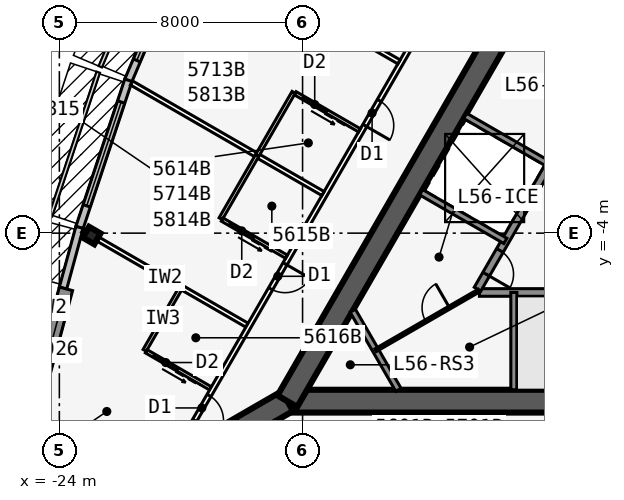
"""IFC4 building model, lengths in metres.
Left out: names, types, materials, properties, quantities, classifications, styles, units other than length and angle.
Written with IfcOpenShell. Run it as: python <this file> out.ifc"""

import sys

from ifc_helpers import new_model, si_unit, direction, frame, frame_2d, origin, origin_2d, place, context, subcontext, project, spatial, polyline, rectangle, i_section, outline, extrude, element, fill, save


model = new_model("IFC4")
c1 = context("Model", 3, precision=1e-05, world=origin(), true_north=direction((0.0, 1.0)))
c2 = subcontext(c1, "Body", "Model", "MODEL_VIEW")
j1 = project(units=[si_unit("LENGTHUNIT", "METRE"), si_unit("PLANEANGLEUNIT", "RADIAN")], contexts=[c1])
p1 = place(None, origin())
s1 = spatial("IfcSite", under=j1, at=p1, CompositionType="ELEMENT")
p2 = place(p1, origin())
s2 = spatial("IfcBuilding", under=s1, at=p2, CompositionType="ELEMENT")
p3 = place(p2, frame((0.0, 0.0, 211.7)))
s3 = spatial("IfcBuildingStorey", under=s2, at=p3, CompositionType="ELEMENT", Elevation=211.7)
p4 = place(p3, frame((-16.5, -9.526, 0.0), z_axis=(0.0, 0.0, 1.0), x_axis=(1.0, 0.0, 0.0)))
e1 = element("IfcWall", 1, at=p4, inside=s3, PredefinedType="SHEAR", context=c2, shape_type="SweptSolid", body=[
    extrude(rectangle(XDim=33.0, YDim=0.75, at=frame_2d((16.5, 0.0))), origin(), (0.0, 0.0, 1.0), 3.6),
])
p5 = place(p4, frame((14.05, 0.0, 0.0)))
e2 = element("IfcOpeningElement", 2, at=p5, cuts=e1, PredefinedType="OPENING", context=c2, shape_type="SweptSolid", body=[
    extrude(rectangle(XDim=1.8, YDim=2.13, at=frame_2d((0.9, 1.065))), frame((0.0, 0.385, 0.0), z_axis=(0.0, -1.0, 0.0), x_axis=(1.0, 0.0, 0.0)), (0.0, 0.0, 1.0), 0.77),
])
p6 = place(p3, frame((-10.183, -5.951, 0.0), z_axis=(0.0, 0.0, 1.0), x_axis=(1.0, 0.0, 0.0)))
e3 = element("IfcWall", 3, at=p6, inside=s3, PredefinedType="SOLIDWALL", context=c2, shape_type="SweptSolid", body=[
    extrude(rectangle(XDim=7.633, YDim=0.25, at=frame_2d((3.816, 0.0))), origin(), (0.0, 0.0, 1.0), 3.435),
])
p7 = place(p3, frame((-9.05, -5.951, 0.0), z_axis=(0.0, 0.0, 1.0), x_axis=(0.0, -1.0, 0.0)))
e4 = element("IfcWall", 4, at=p7, inside=s3, PredefinedType="SOLIDWALL", context=c2, shape_type="SweptSolid", body=[
    extrude(rectangle(XDim=3.2, YDim=0.2, at=frame_2d((1.6, 0.0))), origin(), (0.0, 0.0, 1.0), 3.435),
])
p8 = place(p3, frame((0.0, 19.052, 0.0), z_axis=(0.0, 0.0, 1.0), x_axis=(-0.499999749417, -0.866025548458, 0.0)))
e5 = element("IfcWall", 5, at=p8, inside=s3, PredefinedType="SHEAR", context=c2, shape_type="SweptSolid", body=[
    extrude(rectangle(XDim=33.0, YDim=0.75, at=frame_2d((16.5, 0.0))), origin(), (0.0, 0.0, 1.0), 3.6),
])
p9 = place(p8, frame((14.15, 0.0, 0.0)))
e6 = element("IfcOpeningElement", 6, at=p9, cuts=e5, PredefinedType="OPENING", context=c2, shape_type="SweptSolid", body=[
    extrude(rectangle(XDim=1.8, YDim=2.13, at=frame_2d((0.9, 1.065))), frame((0.0, 0.385, 0.0), z_axis=(0.0, -1.0, 0.0), x_axis=(1.0, 0.0, 0.0)), (0.0, 0.0, 1.0), 0.77),
])
p10 = place(p8, frame((12.6, 0.0, 0.0)))
e7 = element("IfcOpeningElement", 7, at=p10, cuts=e5, PredefinedType="OPENING", context=c2, shape_type="SweptSolid", body=[
    extrude(rectangle(XDim=1.0, YDim=2.13, at=frame_2d((0.5, 1.065))), frame((0.0, 0.385, 0.0), z_axis=(0.0, -1.0, 0.0), x_axis=(1.0, 0.0, 0.0)), (0.0, 0.0, 1.0), 0.77),
])
p11 = place(p3, frame((-4.929, 3.365, 0.0), z_axis=(0.0, 0.0, 1.0), x_axis=(-0.499991433582, -0.866030349552, 0.0)))
e8 = element("IfcWall", 8, at=p11, inside=s3, PredefinedType="SOLIDWALL", context=c2, shape_type="SweptSolid", body=[
    extrude(rectangle(XDim=10.633, YDim=0.25, at=frame_2d((5.316, 0.0))), origin(), (0.0, 0.0, 1.0), 3.435),
])
p12 = place(p11, frame((9.164, 0.0, 0.0)))
e9 = element("IfcOpeningElement", 9, at=p12, cuts=e8, PredefinedType="OPENING", context=c2, shape_type="SweptSolid", body=[
    extrude(rectangle(XDim=0.9, YDim=2.13, at=frame_2d((0.45, 1.065))), frame((0.0, 0.135, 0.0), z_axis=(0.0, -1.0, 0.0), x_axis=(1.0, 0.0, 0.0)), (0.0, 0.0, 1.0), 0.27),
])
p13 = place(p11, frame((1.1, 0.0, 0.0)))
e10 = element("IfcOpeningElement", 10, at=p13, cuts=e8, PredefinedType="OPENING", context=c2, shape_type="SweptSolid", body=[
    extrude(rectangle(XDim=0.9, YDim=2.13, at=frame_2d((0.45, 1.065))), frame((0.0, 0.135, 0.0), z_axis=(0.0, -1.0, 0.0), x_axis=(1.0, 0.0, 0.0)), (0.0, 0.0, 1.0), 0.27),
])
p14 = place(p11, frame((4.0, 0.0, 0.0)))
e11 = element("IfcOpeningElement", 11, at=p14, cuts=e8, PredefinedType="OPENING", context=c2, shape_type="SweptSolid", body=[
    extrude(rectangle(XDim=0.9, YDim=2.13, at=frame_2d((0.45, 1.065))), frame((0.0, 0.135, 0.0), z_axis=(0.0, -1.0, 0.0), x_axis=(1.0, 0.0, 0.0)), (0.0, 0.0, 1.0), 0.27),
])
p15 = place(p3, frame((-7.879, -1.744, 0.0), z_axis=(0.0, 0.0, 1.0), x_axis=(-0.866042017984, 0.499971222258, 0.0)))
e12 = element("IfcWall", 12, at=p15, inside=s3, PredefinedType="SOLIDWALL", context=c2, shape_type="SweptSolid", body=[
    extrude(rectangle(XDim=3.2, YDim=0.2, at=frame_2d((1.6, 0.0))), origin(), (0.0, 0.0, 1.0), 3.435),
])
p16 = place(p3, frame((-9.329, -4.256, 0.0), z_axis=(0.0, 0.0, 1.0), x_axis=(-0.866022944154, 0.50000426018, 0.0)))
e13 = element("IfcWall", 13, at=p16, inside=s3, PredefinedType="SOLIDWALL", context=c2, shape_type="SweptSolid", body=[
    extrude(rectangle(XDim=3.2, YDim=0.2, at=frame_2d((1.6, 0.0))), origin(), (0.0, 0.0, 1.0), 3.435),
])
p17 = place(p3, frame((-16.5, -9.526, 0.0), z_axis=(0.0, 0.0, 1.0), x_axis=(-0.866031398331, -0.499989616998, 0.0)))
e14 = element("IfcWall", 14, at=p17, inside=s3, PredefinedType="SHEAR", context=c2, shape_type="SweptSolid", body=[
    extrude(rectangle(XDim=4.746, YDim=0.75, at=frame_2d((2.373, 0.0))), origin(), (0.0, 0.0, 1.0), 3.6),
])
p18 = place(p17, frame((1.725, 0.0, 0.0)))
e15 = element("IfcOpeningElement", 15, at=p18, cuts=e14, PredefinedType="OPENING", context=c2, shape_type="SweptSolid", body=[
    extrude(rectangle(XDim=1.8, YDim=2.13, at=frame_2d((0.9, 1.065))), frame((0.0, 0.385, 0.0), z_axis=(0.0, -1.0, 0.0), x_axis=(1.0, 0.0, 0.0)), (0.0, 0.0, 1.0), 0.77),
])
p19 = place(p3, frame((-22.937, -4.078, 0.0), z_axis=(0.0, 0.0, 1.0), x_axis=(-0.5, -0.866025403784, 0.0)))
e16 = element("IfcColumn", 16, at=p19, inside=s3, PredefinedType="COLUMN", context=c2, shape_type="SweptSolid", body=[
    extrude(i_section(OverallWidth=0.411, OverallDepth=0.434, WebThickness=0.036, FlangeThickness=0.057, at=origin_2d()), origin(), (0.0, 0.0, 1.0), 3.6),
])
p20 = place(p3, frame((-19.768, 5.657, 0.0), z_axis=(0.0, 0.0, 1.0), x_axis=(-0.390096809471, -0.920773848044, 0.0)))
e17 = element("IfcWall", 17, at=p20, inside=s3, PredefinedType="STANDARD", context=c2, shape_type="SweptSolid", body=[
    extrude(rectangle(XDim=5.038, YDim=0.25, at=frame_2d((2.519, 0.0))), origin(), (0.0, 0.0, 1.0), 3.435),
])
p21 = place(p20, frame((0.719, 0.0, 0.45)))
e18 = element("IfcOpeningElement", 18, at=p21, cuts=e17, PredefinedType="OPENING", context=c2, shape_type="SweptSolid", body=[
    extrude(rectangle(XDim=3.6, YDim=2.6, at=frame_2d((1.8, 1.3))), frame((0.0, 0.135, 0.0), z_axis=(0.0, -1.0, 0.0), x_axis=(1.0, 0.0, 0.0)), (0.0, 0.0, 1.0), 0.27),
])
p22 = place(p3, frame((-21.729, 1.028, 0.0), z_axis=(0.0, 0.0, 1.0), x_axis=(-0.315108478109, -0.949055660656, 0.0)))
e19 = element("IfcWall", 19, at=p22, inside=s3, PredefinedType="STANDARD", context=c2, shape_type="SweptSolid", body=[
    extrude(rectangle(XDim=5.105, YDim=0.25, at=frame_2d((2.552, 0.0))), origin(), (0.0, 0.0, 1.0), 3.435),
])
p23 = place(p22, frame((0.752, 0.0, 0.45)))
e20 = element("IfcOpeningElement", 20, at=p23, cuts=e19, PredefinedType="OPENING", context=c2, shape_type="SweptSolid", body=[
    extrude(rectangle(XDim=3.6, YDim=2.6, at=frame_2d((1.8, 1.3))), frame((0.0, 0.135, 0.0), z_axis=(0.0, -1.0, 0.0), x_axis=(1.0, 0.0, 0.0)), (0.0, 0.0, 1.0), 0.27),
])
p24 = place(p3, frame((-23.336, -3.811, 0.0), z_axis=(0.0, 0.0, 1.0), x_axis=(-0.262867703986, -0.964831887015, 0.0)))
e21 = element("IfcWall", 21, at=p24, inside=s3, PredefinedType="STANDARD", context=c2, shape_type="SweptSolid", body=[
    extrude(rectangle(XDim=2.068, YDim=0.25, at=frame_2d((1.034, 0.0))), origin(), (0.0, 0.0, 1.0), 3.435),
])
p25 = place(p3, frame((-23.783, -5.832, 0.0), z_axis=(0.0, 0.0, 1.0), x_axis=(-0.258784695888, -0.965935029479, 0.0)))
e22 = element("IfcWall", 22, at=p25, inside=s3, PredefinedType="SOLIDWALL", context=c2, shape_type="SweptSolid", body=[
    extrude(rectangle(XDim=4.184, YDim=0.45, at=frame_2d((2.092, 0.0))), origin(), (0.0, 0.0, 1.0), 3.435),
])
p26 = place(p25, frame((0.592, 0.0, 0.45)))
e23 = element("IfcOpeningElement", 23, at=p26, cuts=e22, PredefinedType="OPENING", context=c2, shape_type="SweptSolid", body=[
    extrude(rectangle(XDim=3.0, YDim=2.6, at=frame_2d((1.5, 1.3))), frame((0.0, 0.235, 0.0), z_axis=(0.0, -1.0, 0.0), x_axis=(1.0, 0.0, 0.0)), (0.0, 0.0, 1.0), 0.47),
])
p27 = place(p3, frame((-24.865, -9.757, 0.0), z_axis=(0.0, 0.0, 1.0), x_axis=(0.258799282522, -0.96593112144, 0.0)))
e24 = element("IfcWall", 24, at=p27, inside=s3, PredefinedType="SOLIDWALL", context=c2, shape_type="SweptSolid", body=[
    extrude(outline(polyline([(4.184, 0.225), (4.125, 0.225), (3.705, 0.113), (3.675, 0.225), (0.0, 0.225), (0.0, -0.225), (4.184, -0.225), (4.184, 0.225)])), origin(), (0.0, 0.0, 1.0), 3.435),
])
p28 = place(p27, frame((0.713, 0.0, 0.45)))
e25 = element("IfcOpeningElement", 25, at=p28, cuts=e24, PredefinedType="OPENING", context=c2, shape_type="SweptSolid", body=[
    extrude(rectangle(XDim=2.4, YDim=2.6, at=frame_2d((1.2, 1.3))), frame((0.0, 0.235, 0.0), z_axis=(0.0, -1.0, 0.0), x_axis=(1.0, 0.0, 0.0)), (0.0, 0.0, 1.0), 0.47),
])
p29 = place(p3, frame((-0.425, 22.966, 0.0), z_axis=(0.0, 0.0, 1.0), x_axis=(-0.500000265775, -0.866025250339, 0.0)))
e26 = element("IfcWall", 26, at=p29, inside=s3, PredefinedType="PARTITIONING", context=c2, shape_type="SweptSolid", body=[
    extrude(rectangle(XDim=39.354, YDim=0.15, at=frame_2d((19.677, 0.0))), origin(), (0.0, 0.0, 1.0), 3.435),
])
p30 = place(p29, frame((1.102, 0.0, 0.0)))
e27 = element("IfcOpeningElement", 27, at=p30, cuts=e26, PredefinedType="OPENING", context=c2, shape_type="SweptSolid", body=[
    extrude(rectangle(XDim=0.95, YDim=2.13, at=frame_2d((0.475, 1.065))), frame((0.0, 0.085, 0.0), z_axis=(0.0, -1.0, 0.0), x_axis=(1.0, 0.0, 0.0)), (0.0, 0.0, 1.0), 0.17),
])
p31 = place(p29, frame((6.702, 0.0, 0.0)))
e28 = element("IfcOpeningElement", 28, at=p31, cuts=e26, PredefinedType="OPENING", context=c2, shape_type="SweptSolid", body=[
    extrude(rectangle(XDim=0.95, YDim=2.13, at=frame_2d((0.475, 1.065))), frame((0.0, 0.085, 0.0), z_axis=(0.0, -1.0, 0.0), x_axis=(1.0, 0.0, 0.0)), (0.0, 0.0, 1.0), 0.17),
])
p32 = place(p29, frame((16.702, 0.0, 0.0)))
e29 = element("IfcOpeningElement", 29, at=p32, cuts=e26, PredefinedType="OPENING", context=c2, shape_type="SweptSolid", body=[
    extrude(rectangle(XDim=0.95, YDim=2.13, at=frame_2d((0.475, 1.065))), frame((0.0, 0.085, 0.0), z_axis=(0.0, -1.0, 0.0), x_axis=(1.0, 0.0, 0.0)), (0.0, 0.0, 1.0), 0.17),
])
p33 = place(p29, frame((26.102, 0.0, 0.0)))
e30 = element("IfcOpeningElement", 30, at=p33, cuts=e26, PredefinedType="OPENING", context=c2, shape_type="SweptSolid", body=[
    extrude(rectangle(XDim=0.95, YDim=2.13, at=frame_2d((0.475, 1.065))), frame((0.0, 0.085, 0.0), z_axis=(0.0, -1.0, 0.0), x_axis=(1.0, 0.0, 0.0)), (0.0, 0.0, 1.0), 0.17),
])
p34 = place(p29, frame((32.302, 0.0, 0.0)))
e31 = element("IfcOpeningElement", 31, at=p34, cuts=e26, PredefinedType="OPENING", context=c2, shape_type="SweptSolid", body=[
    extrude(rectangle(XDim=0.95, YDim=2.13, at=frame_2d((0.475, 1.065))), frame((0.0, 0.085, 0.0), z_axis=(0.0, -1.0, 0.0), x_axis=(1.0, 0.0, 0.0)), (0.0, 0.0, 1.0), 0.17),
])
p35 = place(p29, frame((37.302, 0.0, 0.0)))
e32 = element("IfcOpeningElement", 32, at=p35, cuts=e26, PredefinedType="OPENING", context=c2, shape_type="SweptSolid", body=[
    extrude(rectangle(XDim=0.95, YDim=2.13, at=frame_2d((0.475, 1.065))), frame((0.0, 0.085, 0.0), z_axis=(0.0, -1.0, 0.0), x_axis=(1.0, 0.0, 0.0)), (0.0, 0.0, 1.0), 0.17),
])
p36 = place(p3, frame((-12.829, 1.633, 0.0), z_axis=(0.0, 0.0, 1.0), x_axis=(-0.866030558329, 0.49999107196, 0.0)))
e33 = element("IfcWall", 33, at=p36, inside=s3, PredefinedType="PARTITIONING", context=c2, shape_type="SweptSolid", body=[
    extrude(rectangle(XDim=7.894, YDim=0.15, at=frame_2d((3.947, 0.0))), origin(), (0.0, 0.0, 1.0), 2.589),
])
p37 = place(p3, frame((-15.329, -2.697, 0.0), z_axis=(0.0, 0.0, 1.0), x_axis=(-0.866032413668, 0.499987858329, 0.0)))
e34 = element("IfcWall", 34, at=p37, inside=s3, PredefinedType="PARTITIONING", context=c2, shape_type="SweptSolid", body=[
    extrude(rectangle(XDim=7.273, YDim=0.15, at=frame_2d((3.636, 0.0))), origin(), (0.0, 0.0, 1.0), 2.589),
])
p38 = place(p3, frame((-17.829, -7.027, 0.0), z_axis=(0.0, 0.0, 1.0), x_axis=(-0.866026604282, 0.499997920671, 0.0)))
e35 = element("IfcWall", 35, at=p38, inside=s3, PredefinedType="PARTITIONING", context=c2, shape_type="SweptSolid", body=[
    extrude(rectangle(XDim=6.24, YDim=0.15, at=frame_2d((3.12, 0.0))), origin(), (0.0, 0.0, 1.0), 2.589),
])
p39 = place(p3, frame((-16.293, 0.631, 0.0), z_axis=(0.0, 0.0, 1.0), x_axis=(-0.500001309137, -0.866024647952, 0.0)))
e36 = element("IfcWall", 36, at=p39, inside=s3, PredefinedType="PLUMBINGWALL", context=c2, shape_type="SweptSolid", body=[
    extrude(rectangle(XDim=2.4, YDim=0.12, at=frame_2d((1.2, 0.0))), origin(), (0.0, 0.0, 1.0), 3.435),
])
p40 = place(p3, frame((-14.128, -0.619, 0.0), z_axis=(0.0, 0.0, 1.0), x_axis=(-0.866048967903, 0.499959183527, 0.0)))
e37 = element("IfcWall", 37, at=p40, inside=s3, PredefinedType="PLUMBINGWALL", context=c2, shape_type="SweptSolid", body=[
    extrude(rectangle(XDim=2.44, YDim=0.12, at=frame_2d((1.22, 0.0))), origin(), (0.0, 0.0, 1.0), 3.435),
])
p41 = place(p40, frame((1.25, 0.0, 0.0)))
e38 = element("IfcOpeningElement", 38, at=p41, cuts=e37, PredefinedType="OPENING", context=c2, shape_type="SweptSolid", body=[
    extrude(rectangle(XDim=0.9, YDim=2.13, at=frame_2d((0.45, 1.065))), frame((0.0, 0.07, 0.0), z_axis=(0.0, -1.0, 0.0), x_axis=(1.0, 0.0, 0.0)), (0.0, 0.0, 1.0), 0.14),
])
p42 = place(p3, frame((-17.493, -1.447, 0.0), z_axis=(0.0, 0.0, 1.0), x_axis=(-0.500033551112, -0.866006032174, 0.0)))
e39 = element("IfcWall", 39, at=p42, inside=s3, PredefinedType="PLUMBINGWALL", context=c2, shape_type="SweptSolid", body=[
    extrude(rectangle(XDim=2.4, YDim=0.12, at=frame_2d((1.2, 0.0))), origin(), (0.0, 0.0, 1.0), 3.435),
])
p43 = place(p3, frame((-16.529, -4.776, 0.0), z_axis=(0.0, 0.0, 1.0), x_axis=(-0.866023955769, 0.500002508028, 0.0)))
e40 = element("IfcWall", 40, at=p43, inside=s3, PredefinedType="PLUMBINGWALL", context=c2, shape_type="SweptSolid", body=[
    extrude(rectangle(XDim=2.44, YDim=0.12, at=frame_2d((1.22, 0.0))), origin(), (0.0, 0.0, 1.0), 3.435),
])
p44 = place(p43, frame((1.25, 0.0, 0.0)))
e41 = element("IfcOpeningElement", 41, at=p44, cuts=e40, PredefinedType="OPENING", context=c2, shape_type="SweptSolid", body=[
    extrude(rectangle(XDim=0.9, YDim=2.13, at=frame_2d((0.45, 1.065))), frame((0.0, 0.07, 0.0), z_axis=(0.0, -1.0, 0.0), x_axis=(1.0, 0.0, 0.0)), (0.0, 0.0, 1.0), 0.14),
])
p45 = place(p3, frame((-19.993, -5.777, 0.0), z_axis=(0.0, 0.0, 1.0), x_axis=(-0.500033551112, -0.866006032174, 0.0)))
e42 = element("IfcWall", 42, at=p45, inside=s3, PredefinedType="PLUMBINGWALL", context=c2, shape_type="SweptSolid", body=[
    extrude(rectangle(XDim=2.4, YDim=0.12, at=frame_2d((1.2, 0.0))), origin(), (0.0, 0.0, 1.0), 3.435),
])
p46 = place(p3, frame((-19.029, -9.106, 0.0), z_axis=(0.0, 0.0, 1.0), x_axis=(-0.866023955769, 0.500002508028, 0.0)))
e43 = element("IfcWall", 43, at=p46, inside=s3, PredefinedType="PLUMBINGWALL", context=c2, shape_type="SweptSolid", body=[
    extrude(rectangle(XDim=2.44, YDim=0.12, at=frame_2d((1.22, 0.0))), origin(), (0.0, 0.0, 1.0), 3.435),
])
p47 = place(p46, frame((1.25, 0.0, 0.0)))
e44 = element("IfcOpeningElement", 44, at=p47, cuts=e43, PredefinedType="OPENING", context=c2, shape_type="SweptSolid", body=[
    extrude(rectangle(XDim=0.9, YDim=2.13, at=frame_2d((0.45, 1.065))), frame((0.0, 0.07, 0.0), z_axis=(0.0, -1.0, 0.0), x_axis=(1.0, 0.0, 0.0)), (0.0, 0.0, 1.0), 0.14),
])
p48 = place(p3, frame((-12.848, -9.151, 0.0), z_axis=(0.0, 0.0, 1.0), x_axis=(-0.499952404951, 0.866052881055, 0.0)))
e45 = element("IfcWall", 45, at=p48, inside=s3, PredefinedType="SOLIDWALL", context=c2, shape_type="SweptSolid", body=[
    extrude(rectangle(XDim=3.002, YDim=0.2, at=frame_2d((1.501, 0.0))), origin(), (0.0, 0.0, 1.0), 3.435),
])
p49 = place(p3, frame((-13.599, -7.851, 0.0), z_axis=(0.0, 0.0, 1.0), x_axis=(0.866026081073, 0.499998826899, 0.0)))
e46 = element("IfcWall", 46, at=p49, inside=s3, PredefinedType="PARTITIONING", context=c2, shape_type="SweptSolid", body=[
    extrude(rectangle(XDim=3.925, YDim=0.1, at=frame_2d((1.963, 0.0))), origin(), (0.0, 0.0, 1.0), 3.435),
])
p50 = place(p49, frame((1.905, 0.0, 0.0)))
e47 = element("IfcOpeningElement", 47, at=p50, cuts=e46, PredefinedType="OPENING", context=c2, shape_type="SweptSolid", body=[
    extrude(rectangle(XDim=0.9, YDim=2.13, at=frame_2d((0.45, 1.065))), frame((0.0, 0.06, 0.0), z_axis=(0.0, -1.0, 0.0), x_axis=(1.0, 0.0, 0.0)), (0.0, 0.0, 1.0), 0.12),
])
p51 = place(p21, origin())
e48 = element("IfcWindow", 48, at=p51, inside=s3, PartitioningType="SINGLE_PANEL", PredefinedType="WINDOW", context=c2, shape_type="SweptSolid", body=[
    extrude(rectangle(XDim=3.6, YDim=2.6, at=frame_2d((1.8, 1.3))), frame((0.0, 0.03, 0.0), z_axis=(0.0, -1.0, 0.0), x_axis=(1.0, 0.0, 0.0)), (0.0, 0.0, 1.0), 0.06),
])
fill(e18, e48)
p52 = place(p23, origin())
e49 = element("IfcWindow", 49, at=p52, inside=s3, PartitioningType="SINGLE_PANEL", PredefinedType="WINDOW", context=c2, shape_type="SweptSolid", body=[
    extrude(rectangle(XDim=3.6, YDim=2.6, at=frame_2d((1.8, 1.3))), frame((0.0, 0.03, 0.0), z_axis=(0.0, -1.0, 0.0), x_axis=(1.0, 0.0, 0.0)), (0.0, 0.0, 1.0), 0.06),
])
fill(e20, e49)
p53 = place(p26, origin())
e50 = element("IfcWindow", 50, at=p53, inside=s3, PartitioningType="SINGLE_PANEL", PredefinedType="WINDOW", context=c2, shape_type="SweptSolid", body=[
    extrude(rectangle(XDim=3.0, YDim=2.6, at=frame_2d((1.5, 1.3))), frame((0.0, 0.03, 0.0), z_axis=(0.0, -1.0, 0.0), x_axis=(1.0, 0.0, 0.0)), (0.0, 0.0, 1.0), 0.06),
])
fill(e23, e50)
p54 = place(p41, origin())
e51 = element("IfcDoor", 51, at=p54, inside=s3, OperationType="SLIDING_TO_LEFT", PredefinedType="DOOR", context=c2, shape_type="SweptSolid", body=[
    extrude(rectangle(XDim=0.9, YDim=2.13, at=frame_2d((0.45, 1.065))), frame((0.0, 0.025, 0.0), z_axis=(0.0, -1.0, 0.0), x_axis=(1.0, 0.0, 0.0)), (0.0, 0.0, 1.0), 0.05),
])
fill(e38, e51)
p55 = place(p33, origin())
e52 = element("IfcDoor", 52, at=p55, inside=s3, OperationType="SINGLE_SWING_RIGHT", PredefinedType="DOOR", context=c2, shape_type="SweptSolid", body=[
    extrude(rectangle(XDim=0.95, YDim=2.13, at=frame_2d((0.475, 1.065))), frame((0.0, 0.025, 0.0), z_axis=(0.0, -1.0, 0.0), x_axis=(1.0, 0.0, 0.0)), (0.0, 0.0, 1.0), 0.05),
])
fill(e30, e52)
p56 = place(p44, origin())
e53 = element("IfcDoor", 53, at=p56, inside=s3, OperationType="SLIDING_TO_LEFT", PredefinedType="DOOR", context=c2, shape_type="SweptSolid", body=[
    extrude(rectangle(XDim=0.9, YDim=2.13, at=frame_2d((0.45, 1.065))), frame((0.0, 0.025, 0.0), z_axis=(0.0, -1.0, 0.0), x_axis=(1.0, 0.0, 0.0)), (0.0, 0.0, 1.0), 0.05),
])
fill(e41, e53)
p57 = place(p34, origin())
e54 = element("IfcDoor", 54, at=p57, inside=s3, OperationType="SINGLE_SWING_LEFT", PredefinedType="DOOR", context=c2, shape_type="SweptSolid", body=[
    extrude(rectangle(XDim=0.95, YDim=2.13, at=frame_2d((0.475, 1.065))), frame((0.0, 0.025, 0.0), z_axis=(0.0, -1.0, 0.0), x_axis=(1.0, 0.0, 0.0)), (0.0, 0.0, 1.0), 0.05),
])
fill(e31, e54)
p58 = place(p47, origin())
e55 = element("IfcDoor", 55, at=p58, inside=s3, OperationType="SLIDING_TO_LEFT", PredefinedType="DOOR", context=c2, shape_type="SweptSolid", body=[
    extrude(rectangle(XDim=0.9, YDim=2.13, at=frame_2d((0.45, 1.065))), frame((0.0, 0.025, 0.0), z_axis=(0.0, -1.0, 0.0), x_axis=(1.0, 0.0, 0.0)), (0.0, 0.0, 1.0), 0.05),
])
fill(e44, e55)
p59 = place(p35, origin())
e56 = element("IfcDoor", 56, at=p59, inside=s3, OperationType="SINGLE_SWING_RIGHT", PredefinedType="DOOR", context=c2, shape_type="SweptSolid", body=[
    extrude(rectangle(XDim=0.95, YDim=2.13, at=frame_2d((0.475, 1.065))), frame((0.0, 0.025, 0.0), z_axis=(0.0, -1.0, 0.0), x_axis=(1.0, 0.0, 0.0)), (0.0, 0.0, 1.0), 0.05),
])
fill(e32, e56)
p60 = place(p12, origin())
e57 = element("IfcDoor", 57, at=p60, inside=s3, OperationType="SINGLE_SWING_RIGHT", PredefinedType="DOOR", context=c2, shape_type="SweptSolid", body=[
    extrude(rectangle(XDim=0.9, YDim=2.13, at=frame_2d((0.45, 1.065))), frame((0.0, 0.025, 0.0), z_axis=(0.0, -1.0, 0.0), x_axis=(1.0, 0.0, 0.0)), (0.0, 0.0, 1.0), 0.05),
])
fill(e9, e57)
p61 = place(p50, origin())
e58 = element("IfcDoor", 58, at=p61, inside=s3, OperationType="SINGLE_SWING_RIGHT", PredefinedType="DOOR", context=c2, shape_type="SweptSolid", body=[
    extrude(rectangle(XDim=0.9, YDim=2.13, at=frame_2d((0.45, 1.065))), frame((0.0, 0.025, 0.0), z_axis=(0.0, -1.0, 0.0), x_axis=(1.0, 0.0, 0.0)), (0.0, 0.0, 1.0), 0.05),
])
fill(e47, e58)
save(model, sys.argv[1])
